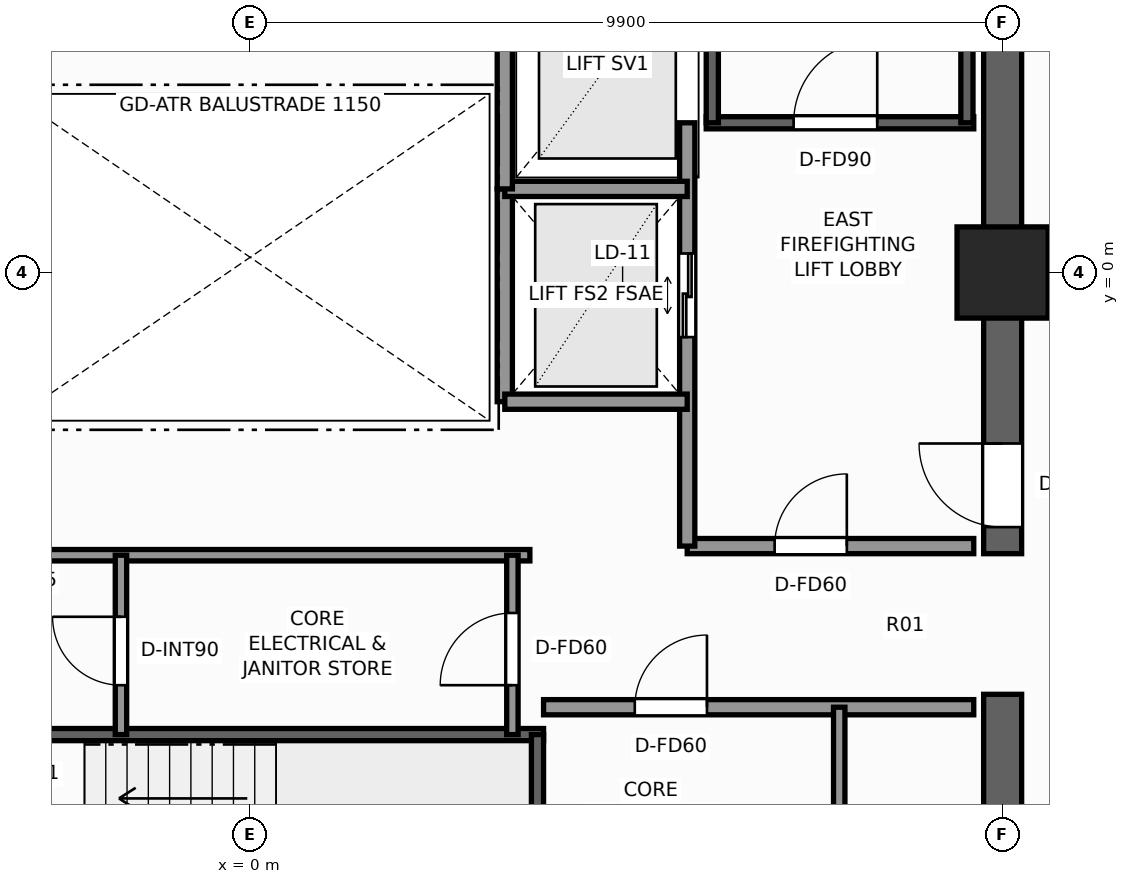
"""IFC4 building model, lengths in metres.
Left out: names, types, materials, properties, quantities, classifications, styles, units other than length and angle.
Written with IfcOpenShell. Run it as: python <this file> out.ifc"""

import sys

from ifc_helpers import new_model, si_unit, direction, frame, frame_2d, origin, origin_2d, place, context, subcontext, project, spatial, rectangle, extrude, element, fill, save


model = new_model("IFC4")
c1 = context("Model", 3, precision=1e-05, world=origin(), true_north=direction((0.0, 1.0)))
c2 = subcontext(c1, "Body", "Model", "MODEL_VIEW")
j1 = project(units=[si_unit("LENGTHUNIT", "METRE"), si_unit("PLANEANGLEUNIT", "RADIAN")], contexts=[c1])
p1 = place(None, origin())
s1 = spatial("IfcSite", under=j1, at=p1, CompositionType="ELEMENT")
p2 = place(p1, origin())
s2 = spatial("IfcBuilding", under=s1, at=p2, CompositionType="ELEMENT")
p3 = place(p2, frame((0.0, 0.0, 141.5)))
s3 = spatial("IfcBuildingStorey", under=s2, at=p3, CompositionType="ELEMENT", Elevation=141.5)
p4 = place(p3, frame((9.9, -9.65, 0.0), z_axis=(0.0, 0.0, 1.0), x_axis=(0.0, 1.0, 0.0)))
e1 = element("IfcWall", 1, at=p4, inside=s3, PredefinedType="SHEAR", context=c2, shape_type="SweptSolid", body=[
    extrude(rectangle(XDim=4.1, YDim=0.5, at=frame_2d((2.05, 0.0))), origin(), (0.0, 0.0, 1.0), 3.3),
])
p5 = place(p3, frame((9.9, -3.7, 0.0), z_axis=(0.0, 0.0, 1.0), x_axis=(0.0, 1.0, 0.0)))
e2 = element("IfcWall", 2, at=p5, inside=s3, PredefinedType="SHEAR", context=c2, shape_type="SweptSolid", body=[
    extrude(rectangle(XDim=13.35, YDim=0.5, at=frame_2d((6.675, 0.0))), origin(), (0.0, 0.0, 1.0), 3.3),
])
p6 = place(p5, frame((0.35, 0.0, 0.0)))
e3 = element("IfcOpeningElement", 3, at=p6, cuts=e2, PredefinedType="OPENING", context=c2, shape_type="SweptSolid", body=[
    extrude(rectangle(XDim=1.1, YDim=2.2, at=frame_2d((0.55, 1.1))), frame((0.0, 0.26, 0.0), z_axis=(0.0, -1.0, 0.0), x_axis=(1.0, 0.0, 0.0)), (0.0, 0.0, 1.0), 0.52),
])
p7 = place(p3, frame((9.9, 0.0, 0.0), z_axis=(0.0, 0.0, 1.0), x_axis=(1.0, 0.0, 0.0)))
e4 = element("IfcColumn", 4, at=p7, inside=s3, PredefinedType="COLUMN", context=c2, shape_type="SweptSolid", body=[
    extrude(rectangle(XDim=1.2, YDim=1.2, at=origin_2d()), origin(), (0.0, 0.0, 1.0), 3.3),
])
p8 = place(p3, frame((6.0, 1.97, 0.0), z_axis=(0.0, 0.0, 1.0), x_axis=(1.0, 0.0, 0.0)))
e5 = element("IfcWall", 5, at=p8, inside=s3, PredefinedType="SHEAR", context=c2, shape_type="SweptSolid", body=[
    extrude(rectangle(XDim=3.52, YDim=0.16, at=frame_2d((1.76, 0.0))), origin(), (0.0, 0.0, 1.0), 3.3),
])
p9 = place(p8, frame((1.15, 0.0, 0.0)))
e6 = element("IfcOpeningElement", 6, at=p9, cuts=e5, PredefinedType="OPENING", context=c2, shape_type="SweptSolid", body=[
    extrude(rectangle(XDim=1.1, YDim=2.2, at=frame_2d((0.55, 1.1))), frame((0.0, 0.09, 0.0), z_axis=(0.0, -1.0, 0.0), x_axis=(1.0, 0.0, 0.0)), (0.0, 0.0, 1.0), 0.18),
])
for number, where, z_axis, x_axis in (
    (7, (6.08, 1.97, 0.0), (0.0, 0.0, 1.0), (0.0, 1.0, 0.0)),
    (8, (9.43, 1.97, 0.0), (0.0, 0.0, 1.0), (0.0, 1.0, 0.0)),
):
    element("IfcWall", number, at=place(p3, frame(where, z_axis=z_axis, x_axis=x_axis)), inside=s3, PredefinedType="SHEAR", context=c2, shape_type="SweptSolid", body=[
        extrude(rectangle(XDim=7.56, YDim=0.16, at=frame_2d((3.78, 0.0))), origin(), (0.0, 0.0, 1.0), 3.3),
    ])
p10 = place(p3, frame((-3.86, -6.08, 0.0), z_axis=(0.0, 0.0, 1.0), x_axis=(1.0, 0.0, 0.0)))
e9 = element("IfcWall", 9, at=p10, inside=s3, PredefinedType="SHEAR", context=c2, shape_type="SweptSolid", body=[
    extrude(rectangle(XDim=7.72, YDim=0.16, at=frame_2d((3.86, 0.0))), origin(), (0.0, 0.0, 1.0), 3.3),
])
p11 = place(p3, frame((3.78, -9.43, 0.0), z_axis=(0.0, 0.0, 1.0), x_axis=(0.0, 1.0, 0.0)))
e10 = element("IfcWall", 10, at=p11, inside=s3, PredefinedType="SHEAR", context=c2, shape_type="SweptSolid", body=[
    extrude(rectangle(XDim=3.35, YDim=0.16, at=frame_2d((1.675, 0.0))), origin(), (0.0, 0.0, 1.0), 3.3),
])
p12 = place(p3, frame((5.75, -3.6, 0.0), z_axis=(0.0, 0.0, 1.0), x_axis=(1.0, 0.0, 0.0)))
e11 = element("IfcWall", 11, at=p12, inside=s3, PredefinedType="SOLIDWALL", context=c2, shape_type="SweptSolid", body=[
    extrude(rectangle(XDim=3.77, YDim=0.2, at=frame_2d((1.885, 0.0))), origin(), (0.0, 0.0, 1.0), 3.1),
])
p13 = place(p12, frame((1.15, 0.0, 0.0)))
e12 = element("IfcOpeningElement", 12, at=p13, cuts=e11, PredefinedType="OPENING", context=c2, shape_type="SweptSolid", body=[
    extrude(rectangle(XDim=0.95, YDim=2.06, at=frame_2d((0.475, 1.03))), frame((0.0, 0.11, 0.0), z_axis=(0.0, -1.0, 0.0), x_axis=(1.0, 0.0, 0.0)), (0.0, 0.0, 1.0), 0.22),
])
p14 = place(p3, frame((5.75, -3.6, 0.0), z_axis=(0.0, 0.0, 1.0), x_axis=(0.0, 1.0, 0.0)))
e13 = element("IfcWall", 13, at=p14, inside=s3, PredefinedType="SOLIDWALL", context=c2, shape_type="SweptSolid", body=[
    extrude(rectangle(XDim=5.57, YDim=0.2, at=frame_2d((2.785, 0.0))), origin(), (0.0, 0.0, 1.0), 2.735),
])
p15 = place(p14, frame((2.75, 0.0, 0.0)))
e14 = element("IfcOpeningElement", 14, at=p15, cuts=e13, PredefinedType="OPENING", context=c2, shape_type="SweptSolid", body=[
    extrude(rectangle(XDim=1.1, YDim=2.2, at=frame_2d((0.55, 1.1))), frame((0.0, 0.11, 0.0), z_axis=(0.0, -1.0, 0.0), x_axis=(1.0, 0.0, 0.0)), (0.0, 0.0, 1.0), 0.22),
])
p16 = place(p3, frame((3.35, -1.7, 0.0), z_axis=(0.0, 0.0, 1.0), x_axis=(0.0, 1.0, 0.0)))
e15 = element("IfcWall", 15, at=p16, inside=s3, PredefinedType="SOLIDWALL", context=c2, shape_type="SweptSolid", body=[
    extrude(rectangle(XDim=2.8, YDim=0.2, at=frame_2d((1.4, 0.0))), origin(), (0.0, 0.0, 1.0), 2.735),
])
for number, where, z_axis, x_axis in (
    (16, (3.35, -1.7, 0.0), (0.0, 0.0, 1.0), (1.0, 0.0, 0.0)),
    (17, (3.35, 1.1, 0.0), (0.0, 0.0, 1.0), (1.0, 0.0, 0.0)),
):
    element("IfcWall", number, at=place(p3, frame(where, z_axis=z_axis, x_axis=x_axis)), inside=s3, PredefinedType="SOLIDWALL", context=c2, shape_type="SweptSolid", body=[
        extrude(rectangle(XDim=2.4, YDim=0.2, at=frame_2d((1.2, 0.0))), origin(), (0.0, 0.0, 1.0), 3.1),
    ])
p17 = place(p3, frame((3.35, 1.1, 0.0), z_axis=(0.0, 0.0, 1.0), x_axis=(0.0, 1.0, 0.0)))
e18 = element("IfcWall", 18, at=p17, inside=s3, PredefinedType="SOLIDWALL", context=c2, shape_type="SweptSolid", body=[
    extrude(rectangle(XDim=3.2, YDim=0.2, at=frame_2d((1.6, 0.0))), origin(), (0.0, 0.0, 1.0), 2.735),
])
p18 = place(p3, frame((3.86, -5.72, 0.0), z_axis=(0.0, 0.0, 1.0), x_axis=(1.0, 0.0, 0.0)))
e19 = element("IfcWall", 19, at=p18, inside=s3, PredefinedType="SOLIDWALL", context=c2, shape_type="SweptSolid", body=[
    extrude(rectangle(XDim=5.66, YDim=0.2, at=frame_2d((2.83, 0.0))), origin(), (0.0, 0.0, 1.0), 3.1),
])
p19 = place(p18, frame((1.2, 0.0, 0.0)))
e20 = element("IfcOpeningElement", 20, at=p19, cuts=e19, PredefinedType="OPENING", context=c2, shape_type="SweptSolid", body=[
    extrude(rectangle(XDim=0.95, YDim=2.06, at=frame_2d((0.475, 1.03))), frame((0.0, 0.11, 0.0), z_axis=(0.0, -1.0, 0.0), x_axis=(1.0, 0.0, 0.0)), (0.0, 0.0, 1.0), 0.22),
])
p20 = place(p3, frame((7.75, -9.52, 0.0), z_axis=(0.0, 0.0, 1.0), x_axis=(0.0, 1.0, 0.0)))
e21 = element("IfcWall", 21, at=p20, inside=s3, PredefinedType="PARTITIONING", context=c2, shape_type="SweptSolid", body=[
    extrude(rectangle(XDim=3.8, YDim=0.15, at=frame_2d((1.9, 0.0))), origin(), (0.0, 0.0, 1.0), 3.1),
])
p21 = place(p20, frame((0.9, 0.0, 0.0)))
e22 = element("IfcOpeningElement", 22, at=p21, cuts=e21, PredefinedType="OPENING", context=c2, shape_type="SweptSolid", body=[
    extrude(rectangle(XDim=0.85, YDim=2.03, at=frame_2d((0.425, 1.015))), frame((0.0, 0.085, 0.0), z_axis=(0.0, -1.0, 0.0), x_axis=(1.0, 0.0, 0.0)), (0.0, 0.0, 1.0), 0.17),
])
p22 = place(p3, frame((-3.68, -3.72, 0.0), z_axis=(0.0, 0.0, 1.0), x_axis=(1.0, 0.0, 0.0)))
e23 = element("IfcWall", 23, at=p22, inside=s3, PredefinedType="PARTITIONING", context=c2, shape_type="SweptSolid", body=[
    extrude(rectangle(XDim=7.36, YDim=0.15, at=frame_2d((3.68, 0.0))), origin(), (0.0, 0.0, 1.0), 3.1),
])
p23 = place(p3, frame((3.45, -6.08, 0.0), z_axis=(0.0, 0.0, 1.0), x_axis=(0.0, 1.0, 0.0)))
e24 = element("IfcWall", 24, at=p23, inside=s3, PredefinedType="PARTITIONING", context=c2, shape_type="SweptSolid", body=[
    extrude(rectangle(XDim=2.36, YDim=0.15, at=frame_2d((1.18, 0.0))), origin(), (0.0, 0.0, 1.0), 3.1),
])
p24 = place(p23, frame((0.65, 0.0, 0.0)))
e25 = element("IfcOpeningElement", 25, at=p24, cuts=e24, PredefinedType="OPENING", context=c2, shape_type="SweptSolid", body=[
    extrude(rectangle(XDim=0.95, YDim=2.06, at=frame_2d((0.475, 1.03))), frame((0.0, 0.085, 0.0), z_axis=(0.0, -1.0, 0.0), x_axis=(1.0, 0.0, 0.0)), (0.0, 0.0, 1.0), 0.17),
])
p25 = place(p3, frame((-1.7, -6.08, 0.0), z_axis=(0.0, 0.0, 1.0), x_axis=(0.0, 1.0, 0.0)))
e26 = element("IfcWall", 26, at=p25, inside=s3, PredefinedType="PARTITIONING", context=c2, shape_type="SweptSolid", body=[
    extrude(rectangle(XDim=2.36, YDim=0.15, at=frame_2d((1.18, 0.0))), origin(), (0.0, 0.0, 1.0), 3.1),
])
p26 = place(p25, frame((0.65, 0.0, 0.0)))
e27 = element("IfcOpeningElement", 27, at=p26, cuts=e26, PredefinedType="OPENING", context=c2, shape_type="SweptSolid", body=[
    extrude(rectangle(XDim=0.9, YDim=2.06, at=frame_2d((0.45, 1.03))), frame((0.0, 0.085, 0.0), z_axis=(0.0, -1.0, 0.0), x_axis=(1.0, 0.0, 0.0)), (0.0, 0.0, 1.0), 0.17),
])
p27 = place(p9, origin())
e28 = element("IfcDoor", 28, at=p27, inside=s3, OperationType="SINGLE_SWING_RIGHT", PredefinedType="DOOR", context=c2, shape_type="SweptSolid", body=[
    extrude(rectangle(XDim=1.1, YDim=2.2, at=frame_2d((0.55, 1.1))), frame((0.0, 0.025, 0.0), z_axis=(0.0, -1.0, 0.0), x_axis=(1.0, 0.0, 0.0)), (0.0, 0.0, 1.0), 0.05),
])
fill(e6, e28)
p28 = place(p6, origin())
e29 = element("IfcDoor", 29, at=p28, inside=s3, OperationType="SINGLE_SWING_RIGHT", PredefinedType="DOOR", context=c2, shape_type="SweptSolid", body=[
    extrude(rectangle(XDim=1.1, YDim=2.2, at=frame_2d((0.55, 1.1))), frame((0.0, 0.025, 0.0), z_axis=(0.0, -1.0, 0.0), x_axis=(1.0, 0.0, 0.0)), (0.0, 0.0, 1.0), 0.05),
])
fill(e3, e29)
p29 = place(p15, origin())
e30 = element("IfcDoor", 30, at=p29, inside=s3, OperationType="DOUBLE_DOOR_SLIDING", PredefinedType="DOOR", context=c2, shape_type="SweptSolid", body=[
    extrude(rectangle(XDim=1.1, YDim=2.2, at=frame_2d((0.55, 1.1))), frame((0.0, 0.025, 0.0), z_axis=(0.0, -1.0, 0.0), x_axis=(1.0, 0.0, 0.0)), (0.0, 0.0, 1.0), 0.05),
])
fill(e14, e30)
p30 = place(p19, origin())
e31 = element("IfcDoor", 31, at=p30, inside=s3, OperationType="SINGLE_SWING_RIGHT", PredefinedType="DOOR", context=c2, shape_type="SweptSolid", body=[
    extrude(rectangle(XDim=0.95, YDim=2.06, at=frame_2d((0.475, 1.03))), frame((0.0, 0.025, 0.0), z_axis=(0.0, -1.0, 0.0), x_axis=(1.0, 0.0, 0.0)), (0.0, 0.0, 1.0), 0.05),
])
fill(e20, e31)
p31 = place(p13, origin())
e32 = element("IfcDoor", 32, at=p31, inside=s3, OperationType="SINGLE_SWING_RIGHT", PredefinedType="DOOR", context=c2, shape_type="SweptSolid", body=[
    extrude(rectangle(XDim=0.95, YDim=2.06, at=frame_2d((0.475, 1.03))), frame((0.0, 0.025, 0.0), z_axis=(0.0, -1.0, 0.0), x_axis=(1.0, 0.0, 0.0)), (0.0, 0.0, 1.0), 0.05),
])
fill(e12, e32)
p32 = place(p24, origin())
e33 = element("IfcDoor", 33, at=p32, inside=s3, OperationType="SINGLE_SWING_LEFT", PredefinedType="DOOR", context=c2, shape_type="SweptSolid", body=[
    extrude(rectangle(XDim=0.95, YDim=2.06, at=frame_2d((0.475, 1.03))), frame((0.0, 0.025, 0.0), z_axis=(0.0, -1.0, 0.0), x_axis=(1.0, 0.0, 0.0)), (0.0, 0.0, 1.0), 0.05),
])
fill(e25, e33)
p33 = place(p26, origin())
e34 = element("IfcDoor", 34, at=p33, inside=s3, OperationType="SINGLE_SWING_RIGHT", PredefinedType="DOOR", context=c2, shape_type="SweptSolid", body=[
    extrude(rectangle(XDim=0.9, YDim=2.06, at=frame_2d((0.45, 1.03))), frame((0.0, 0.025, 0.0), z_axis=(0.0, -1.0, 0.0), x_axis=(1.0, 0.0, 0.0)), (0.0, 0.0, 1.0), 0.05),
])
fill(e27, e34)
save(model, sys.argv[1])
